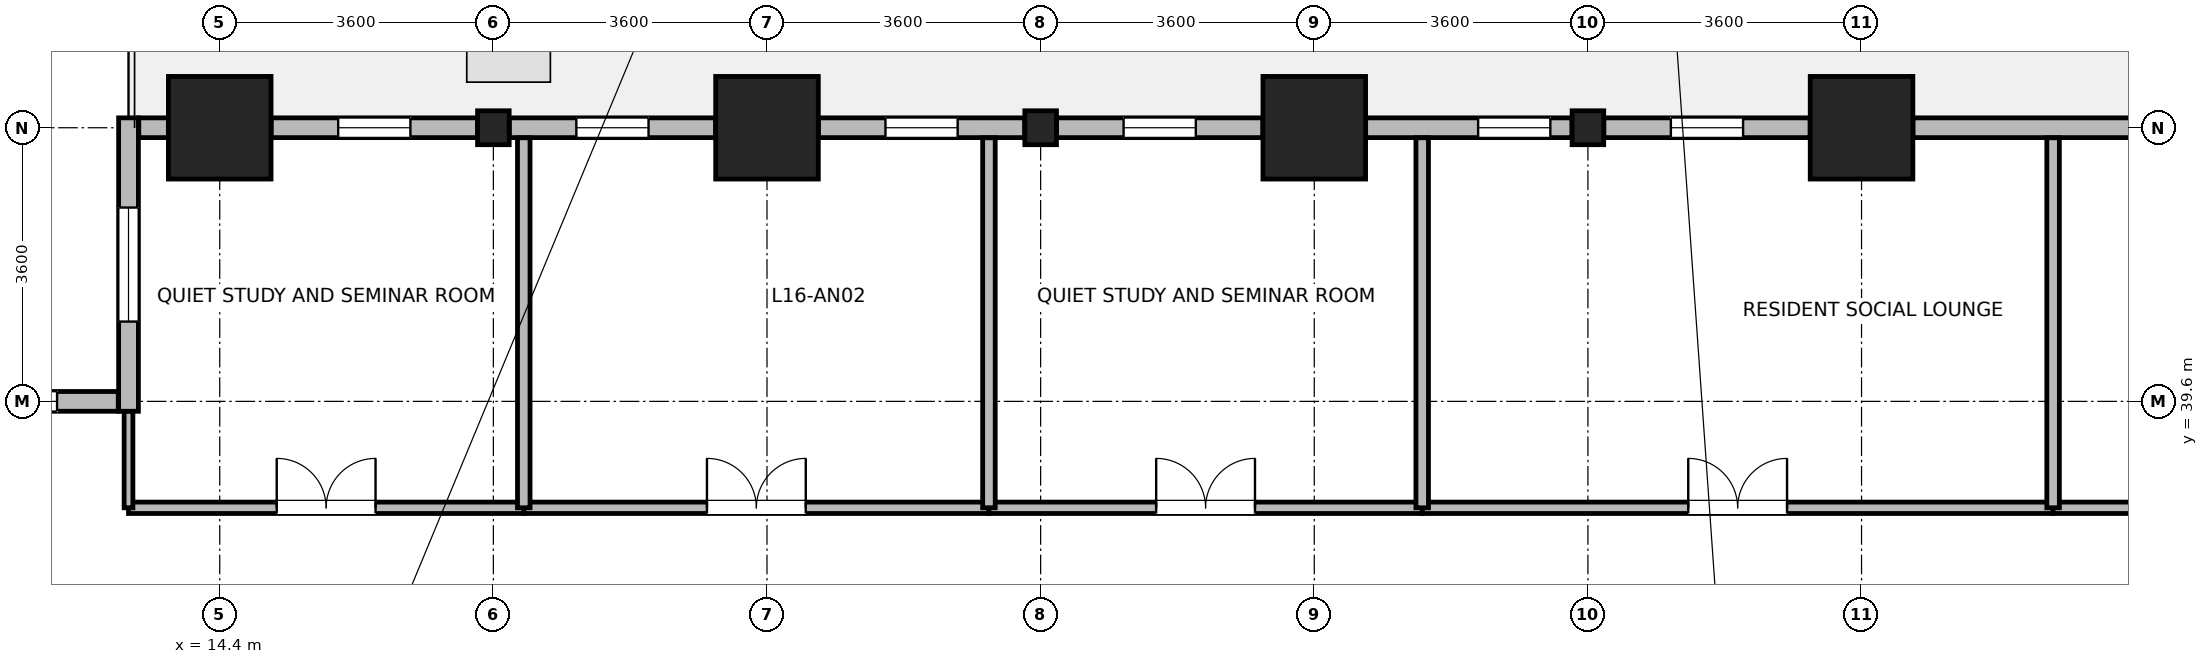
"""IFC4 building model, lengths in metres.
Left out: names, types, materials, properties, quantities, classifications, styles, units other than length and angle.
Written with IfcOpenShell. Run it as: python <this file> out.ifc"""

import sys

from ifc_helpers import new_model, si_unit, direction, frame, frame_2d, origin, origin_2d, place, context, subcontext, project, spatial, rectangle, i_section, extrude, source, transform, mapped, element, fill, save


model = new_model("IFC4")
c1 = context("Model", 3, precision=1e-05, world=origin(), true_north=direction((0.0, 1.0)))
c2 = subcontext(c1, "Body", "Model", "MODEL_VIEW")
j1 = project(units=[si_unit("LENGTHUNIT", "METRE"), si_unit("PLANEANGLEUNIT", "RADIAN")], contexts=[c1])
p1 = place(None, origin())
s1 = spatial("IfcSite", under=j1, at=p1, CompositionType="ELEMENT")
p2 = place(p1, origin())
s2 = spatial("IfcBuilding", under=s1, at=p2, CompositionType="ELEMENT")
p3 = place(p2, frame((0.0, 0.0, 66.0)))
s3 = spatial("IfcBuildingStorey", under=s2, at=p3, CompositionType="ELEMENT", Elevation=66.0)
m1 = source(origin(), c2, "Body", "SweptSolid", [
    extrude(rectangle(XDim=1.35, YDim=1.35, at=origin_2d()), origin(), (0.0, 0.0, 1.0), 3.7),
])
for number, where, z_axis, x_axis in (
    (1, (14.4, 43.2, 0.0), (0.0, 0.0, 1.0), (1.0, 0.0, 0.0)),
    (2, (21.6, 43.2, 0.0), (0.0, 0.0, 1.0), (1.0, 0.0, 0.0)),
    (3, (28.8, 43.2, 0.0), (0.0, 0.0, 1.0), (1.0, 0.0, 0.0)),
    (4, (36.0, 43.2, 0.0), (0.0, 0.0, 1.0), (1.0, 0.0, 0.0)),
):
    element("IfcColumn", number, at=place(p3, frame(where, z_axis=z_axis, x_axis=x_axis)), inside=s3, PredefinedType="COLUMN", context=c2, shape_type="MappedRepresentation", body=[
        mapped(m1, transform((0.0, 0.0, 0.0), x_axis=(1.0, 0.0, 0.0), y_axis=(0.0, 1.0, 0.0), z_axis=(0.0, 0.0, 1.0), scale=1.0)),
    ])
m2 = source(origin(), c2, "Body", "SweptSolid", [
    extrude(i_section(OverallWidth=0.416, OverallDepth=0.446, WebThickness=0.029, FlangeThickness=0.04, FilletRadius=0.015, at=origin_2d()), origin(), (0.0, 0.0, 1.0), 3.7),
])
for number, where, z_axis, x_axis in (
    (5, (18.0, 43.2, 0.0), (0.0, 0.0, 1.0), (1.0, 0.0, 0.0)),
    (6, (25.2, 43.2, 0.0), (0.0, 0.0, 1.0), (1.0, 0.0, 0.0)),
    (7, (32.4, 43.2, 0.0), (0.0, 0.0, 1.0), (1.0, 0.0, 0.0)),
):
    element("IfcColumn", number, at=place(p3, frame(where, z_axis=z_axis, x_axis=x_axis)), inside=s3, PredefinedType="COLUMN", context=c2, shape_type="MappedRepresentation", body=[
        mapped(m2, transform((0.0, 0.0, 0.0), x_axis=(1.0, 0.0, 0.0), y_axis=(0.0, 1.0, 0.0), z_axis=(0.0, 0.0, 1.0), scale=1.0)),
    ])
p4 = place(p3, frame((36.676, 43.2, 0.0), z_axis=(0.0, 0.0, 1.0), x_axis=(1.0, 0.0, 0.0)))
e8 = element("IfcWall", 8, at=p4, inside=s3, PredefinedType="STANDARD", context=c2, shape_type="SweptSolid", body=[
    extrude(rectangle(XDim=9.448, YDim=0.26, at=frame_2d((4.724, 0.0))), origin(), (0.0, 0.0, 1.0), 2.93),
])
p5 = place(p4, frame((3.974, 0.0, 0.0)))
e9 = element("IfcOpeningElement", 9, at=p5, cuts=e8, PredefinedType="OPENING", context=c2, shape_type="SweptSolid", body=[
    extrude(rectangle(XDim=1.5, YDim=2.15, at=frame_2d((0.75, 1.075))), frame((0.0, 0.14, 0.0), z_axis=(0.0, -1.0, 0.0), x_axis=(1.0, 0.0, 0.0)), (0.0, 0.0, 1.0), 0.28),
])
p6 = place(p4, frame((7.123, 0.0, 0.85)))
e10 = element("IfcOpeningElement", 10, at=p6, cuts=e8, PredefinedType="OPENING", context=c2, shape_type="SweptSolid", body=[
    extrude(rectangle(XDim=1.5, YDim=1.85, at=frame_2d((0.75, 0.925))), frame((0.0, 0.14, 0.0), z_axis=(0.0, -1.0, 0.0), x_axis=(1.0, 0.0, 0.0)), (0.0, 0.0, 1.0), 0.28),
])
p7 = place(p3, frame((32.609, 43.2, 0.0), z_axis=(0.0, 0.0, 1.0), x_axis=(1.0, 0.0, 0.0)))
e11 = element("IfcWall", 11, at=p7, inside=s3, PredefinedType="STANDARD", context=c2, shape_type="SweptSolid", body=[
    extrude(rectangle(XDim=2.715, YDim=0.26, at=frame_2d((1.357, 0.0))), origin(), (0.0, 0.0, 1.0), 2.93),
])
p8 = place(p7, frame((0.883, 0.0, 0.85)))
e12 = element("IfcOpeningElement", 12, at=p8, cuts=e11, PredefinedType="OPENING", context=c2, shape_type="SweptSolid", body=[
    extrude(rectangle(XDim=0.95, YDim=1.75, at=frame_2d((0.475, 0.875))), frame((0.0, 0.14, 0.0), z_axis=(0.0, -1.0, 0.0), x_axis=(1.0, 0.0, 0.0)), (0.0, 0.0, 1.0), 0.28),
])
p9 = place(p3, frame((29.476, 43.2, 0.0), z_axis=(0.0, 0.0, 1.0), x_axis=(1.0, 0.0, 0.0)))
e13 = element("IfcWall", 13, at=p9, inside=s3, PredefinedType="STANDARD", context=c2, shape_type="SweptSolid", body=[
    extrude(rectangle(XDim=2.715, YDim=0.26, at=frame_2d((1.357, 0.0))), origin(), (0.0, 0.0, 1.0), 2.93),
])
p10 = place(p9, frame((1.48, 0.0, 0.85)))
e14 = element("IfcOpeningElement", 14, at=p10, cuts=e13, PredefinedType="OPENING", context=c2, shape_type="SweptSolid", body=[
    extrude(rectangle(XDim=0.95, YDim=1.75, at=frame_2d((0.475, 0.875))), frame((0.0, 0.14, 0.0), z_axis=(0.0, -1.0, 0.0), x_axis=(1.0, 0.0, 0.0)), (0.0, 0.0, 1.0), 0.28),
])
p11 = place(p3, frame((25.409, 43.2, 0.0), z_axis=(0.0, 0.0, 1.0), x_axis=(1.0, 0.0, 0.0)))
e15 = element("IfcWall", 15, at=p11, inside=s3, PredefinedType="STANDARD", context=c2, shape_type="SweptSolid", body=[
    extrude(rectangle(XDim=2.715, YDim=0.26, at=frame_2d((1.357, 0.0))), origin(), (0.0, 0.0, 1.0), 2.93),
])
p12 = place(p11, frame((0.883, 0.0, 0.85)))
e16 = element("IfcOpeningElement", 16, at=p12, cuts=e15, PredefinedType="OPENING", context=c2, shape_type="SweptSolid", body=[
    extrude(rectangle(XDim=0.95, YDim=1.75, at=frame_2d((0.475, 0.875))), frame((0.0, 0.14, 0.0), z_axis=(0.0, -1.0, 0.0), x_axis=(1.0, 0.0, 0.0)), (0.0, 0.0, 1.0), 0.28),
])
p13 = place(p3, frame((22.276, 43.2, 0.0), z_axis=(0.0, 0.0, 1.0), x_axis=(1.0, 0.0, 0.0)))
e17 = element("IfcWall", 17, at=p13, inside=s3, PredefinedType="STANDARD", context=c2, shape_type="SweptSolid", body=[
    extrude(rectangle(XDim=2.715, YDim=0.26, at=frame_2d((1.357, 0.0))), origin(), (0.0, 0.0, 1.0), 2.93),
])
p14 = place(p13, frame((0.883, 0.0, 0.85)))
e18 = element("IfcOpeningElement", 18, at=p14, cuts=e17, PredefinedType="OPENING", context=c2, shape_type="SweptSolid", body=[
    extrude(rectangle(XDim=0.95, YDim=1.75, at=frame_2d((0.475, 0.875))), frame((0.0, 0.14, 0.0), z_axis=(0.0, -1.0, 0.0), x_axis=(1.0, 0.0, 0.0)), (0.0, 0.0, 1.0), 0.28),
])
p15 = place(p3, frame((18.209, 43.2, 0.0), z_axis=(0.0, 0.0, 1.0), x_axis=(1.0, 0.0, 0.0)))
e19 = element("IfcWall", 19, at=p15, inside=s3, PredefinedType="STANDARD", context=c2, shape_type="SweptSolid", body=[
    extrude(rectangle(XDim=2.715, YDim=0.26, at=frame_2d((1.357, 0.0))), origin(), (0.0, 0.0, 1.0), 2.93),
])
p16 = place(p15, frame((0.883, 0.0, 0.85)))
e20 = element("IfcOpeningElement", 20, at=p16, cuts=e19, PredefinedType="OPENING", context=c2, shape_type="SweptSolid", body=[
    extrude(rectangle(XDim=0.95, YDim=1.75, at=frame_2d((0.475, 0.875))), frame((0.0, 0.14, 0.0), z_axis=(0.0, -1.0, 0.0), x_axis=(1.0, 0.0, 0.0)), (0.0, 0.0, 1.0), 0.28),
])
p17 = place(p3, frame((15.076, 43.2, 0.0), z_axis=(0.0, 0.0, 1.0), x_axis=(1.0, 0.0, 0.0)))
e21 = element("IfcWall", 21, at=p17, inside=s3, PredefinedType="STANDARD", context=c2, shape_type="SweptSolid", body=[
    extrude(rectangle(XDim=2.715, YDim=0.26, at=frame_2d((1.357, 0.0))), origin(), (0.0, 0.0, 1.0), 2.93),
])
p18 = place(p17, frame((0.883, 0.0, 0.85)))
e22 = element("IfcOpeningElement", 22, at=p18, cuts=e21, PredefinedType="OPENING", context=c2, shape_type="SweptSolid", body=[
    extrude(rectangle(XDim=0.95, YDim=1.75, at=frame_2d((0.475, 0.875))), frame((0.0, 0.14, 0.0), z_axis=(0.0, -1.0, 0.0), x_axis=(1.0, 0.0, 0.0)), (0.0, 0.0, 1.0), 0.28),
])
p19 = place(p3, frame((13.335, 43.2, 0.0), z_axis=(0.0, 0.0, 1.0), x_axis=(1.0, 0.0, 0.0)))
e23 = element("IfcWall", 23, at=p19, inside=s3, PredefinedType="STANDARD", context=c2, shape_type="SweptSolid", body=[
    extrude(rectangle(XDim=0.389, YDim=0.26, at=frame_2d((0.195, 0.0))), origin(), (0.0, 0.0, 1.0), 3.43),
])
p20 = place(p3, frame((13.2, 39.47, 0.0), z_axis=(0.0, 0.0, 1.0), x_axis=(0.0, 1.0, 0.0)))
e24 = element("IfcWall", 24, at=p20, inside=s3, PredefinedType="STANDARD", context=c2, shape_type="SweptSolid", body=[
    extrude(rectangle(XDim=3.86, YDim=0.26, at=frame_2d((1.93, 0.0))), origin(), (0.0, 0.0, 1.0), 3.43),
])
p21 = place(p20, frame((1.18, 0.0, 0.85)))
e25 = element("IfcOpeningElement", 25, at=p21, cuts=e24, PredefinedType="OPENING", context=c2, shape_type="SweptSolid", body=[
    extrude(rectangle(XDim=1.5, YDim=1.85, at=frame_2d((0.75, 0.925))), frame((0.0, 0.14, 0.0), z_axis=(0.0, -1.0, 0.0), x_axis=(1.0, 0.0, 0.0)), (0.0, 0.0, 1.0), 0.28),
])
p22 = place(p3, frame((3.735, 39.6, 0.0), z_axis=(0.0, 0.0, 1.0), x_axis=(1.0, 0.0, 0.0)))
e26 = element("IfcWall", 26, at=p22, inside=s3, PredefinedType="STANDARD", context=c2, shape_type="SweptSolid", body=[
    extrude(rectangle(XDim=9.33, YDim=0.26, at=frame_2d((4.665, 0.0))), origin(), (0.0, 0.0, 1.0), 3.43),
])
p23 = place(p22, frame((0.805, 0.0, 0.85)))
e27 = element("IfcOpeningElement", 27, at=p23, cuts=e26, PredefinedType="OPENING", context=c2, shape_type="SweptSolid", body=[
    extrude(rectangle(XDim=1.5, YDim=1.85, at=frame_2d((0.75, 0.925))), frame((0.0, 0.14, 0.0), z_axis=(0.0, -1.0, 0.0), x_axis=(1.0, 0.0, 0.0)), (0.0, 0.0, 1.0), 0.28),
])
p24 = place(p22, frame((3.915, 0.0, 0.85)))
e28 = element("IfcOpeningElement", 28, at=p24, cuts=e26, PredefinedType="OPENING", context=c2, shape_type="SweptSolid", body=[
    extrude(rectangle(XDim=1.5, YDim=1.85, at=frame_2d((0.75, 0.925))), frame((0.0, 0.14, 0.0), z_axis=(0.0, -1.0, 0.0), x_axis=(1.0, 0.0, 0.0)), (0.0, 0.0, 1.0), 0.28),
])
p25 = place(p22, frame((7.025, 0.0, 0.85)))
e29 = element("IfcOpeningElement", 29, at=p25, cuts=e26, PredefinedType="OPENING", context=c2, shape_type="SweptSolid", body=[
    extrude(rectangle(XDim=1.5, YDim=1.85, at=frame_2d((0.75, 0.925))), frame((0.0, 0.14, 0.0), z_axis=(0.0, -1.0, 0.0), x_axis=(1.0, 0.0, 0.0)), (0.0, 0.0, 1.0), 0.28),
])
p26 = place(p3, frame((30.22, 38.2, 0.0), z_axis=(0.0, 0.0, 1.0), x_axis=(1.0, 0.0, 0.0)))
e30 = element("IfcWall", 30, at=p26, inside=s3, PredefinedType="PARTITIONING", context=c2, shape_type="SweptSolid", body=[
    extrude(rectangle(XDim=8.3, YDim=0.15, at=frame_2d((4.15, 0.0))), origin(), (0.0, 0.0, 1.0), 3.43),
])
p27 = place(p26, frame((3.5, 0.0, 0.0)))
e31 = element("IfcOpeningElement", 31, at=p27, cuts=e30, PredefinedType="OPENING", context=c2, shape_type="SweptSolid", body=[
    extrude(rectangle(XDim=1.3, YDim=2.12, at=frame_2d((0.65, 1.06))), frame((0.0, 0.085, 0.0), z_axis=(0.0, -1.0, 0.0), x_axis=(1.0, 0.0, 0.0)), (0.0, 0.0, 1.0), 0.17),
])
p28 = place(p3, frame((38.52, 38.2, 0.0), z_axis=(0.0, 0.0, 1.0), x_axis=(1.0, 0.0, 0.0)))
e32 = element("IfcWall", 32, at=p28, inside=s3, PredefinedType="PARTITIONING", context=c2, shape_type="SweptSolid", body=[
    extrude(rectangle(XDim=7.64, YDim=0.15, at=frame_2d((3.82, 0.0))), origin(), (0.0, 0.0, 1.0), 3.43),
])
p29 = place(p28, frame((3.37, 0.0, 0.0)))
e33 = element("IfcOpeningElement", 33, at=p29, cuts=e32, PredefinedType="OPENING", context=c2, shape_type="SweptSolid", body=[
    extrude(rectangle(XDim=0.9, YDim=2.08, at=frame_2d((0.45, 1.04))), frame((0.0, 0.085, 0.0), z_axis=(0.0, -1.0, 0.0), x_axis=(1.0, 0.0, 0.0)), (0.0, 0.0, 1.0), 0.17),
])
p30 = place(p3, frame((18.4, 38.2, 0.0), z_axis=(0.0, 0.0, 1.0), x_axis=(1.0, 0.0, 0.0)))
e34 = element("IfcWall", 34, at=p30, inside=s3, PredefinedType="PARTITIONING", context=c2, shape_type="SweptSolid", body=[
    extrude(rectangle(XDim=6.12, YDim=0.15, at=frame_2d((3.06, 0.0))), origin(), (0.0, 0.0, 1.0), 3.43),
])
p31 = place(p30, frame((2.41, 0.0, 0.0)))
e35 = element("IfcOpeningElement", 35, at=p31, cuts=e34, PredefinedType="OPENING", context=c2, shape_type="SweptSolid", body=[
    extrude(rectangle(XDim=1.3, YDim=2.12, at=frame_2d((0.65, 1.06))), frame((0.0, 0.085, 0.0), z_axis=(0.0, -1.0, 0.0), x_axis=(1.0, 0.0, 0.0)), (0.0, 0.0, 1.0), 0.17),
])
p32 = place(p3, frame((24.52, 38.2, 0.0), z_axis=(0.0, 0.0, 1.0), x_axis=(1.0, 0.0, 0.0)))
e36 = element("IfcWall", 36, at=p32, inside=s3, PredefinedType="PARTITIONING", context=c2, shape_type="SweptSolid", body=[
    extrude(rectangle(XDim=5.7, YDim=0.15, at=frame_2d((2.85, 0.0))), origin(), (0.0, 0.0, 1.0), 3.43),
])
p33 = place(p32, frame((2.2, 0.0, 0.0)))
e37 = element("IfcOpeningElement", 37, at=p33, cuts=e36, PredefinedType="OPENING", context=c2, shape_type="SweptSolid", body=[
    extrude(rectangle(XDim=1.3, YDim=2.12, at=frame_2d((0.65, 1.06))), frame((0.0, 0.085, 0.0), z_axis=(0.0, -1.0, 0.0), x_axis=(1.0, 0.0, 0.0)), (0.0, 0.0, 1.0), 0.17),
])
p34 = place(p3, frame((13.2, 38.2, 0.0), z_axis=(0.0, 0.0, 1.0), x_axis=(1.0, 0.0, 0.0)))
e38 = element("IfcWall", 38, at=p34, inside=s3, PredefinedType="PARTITIONING", context=c2, shape_type="SweptSolid", body=[
    extrude(rectangle(XDim=5.2, YDim=0.15, at=frame_2d((2.6, 0.0))), origin(), (0.0, 0.0, 1.0), 3.43),
])
p35 = place(p34, frame((1.95, 0.0, 0.0)))
e39 = element("IfcOpeningElement", 39, at=p35, cuts=e38, PredefinedType="OPENING", context=c2, shape_type="SweptSolid", body=[
    extrude(rectangle(XDim=1.3, YDim=2.12, at=frame_2d((0.65, 1.06))), frame((0.0, 0.085, 0.0), z_axis=(0.0, -1.0, 0.0), x_axis=(1.0, 0.0, 0.0)), (0.0, 0.0, 1.0), 0.17),
])
p36 = place(p3, frame((13.2, 38.2, 0.0), z_axis=(0.0, 0.0, 1.0), x_axis=(0.0, 1.0, 0.0)))
e40 = element("IfcWall", 40, at=p36, inside=s3, PredefinedType="PARTITIONING", context=c2, shape_type="SweptSolid", body=[
    extrude(rectangle(XDim=1.268, YDim=0.115, at=frame_2d((0.634, 0.0))), origin(), (0.0, 0.0, 1.0), 3.43),
])
for number, where, z_axis, x_axis in (
    (41, (18.4, 38.2, 0.0), (0.0, 0.0, 1.0), (0.0, 1.0, 0.0)),
    (42, (24.52, 38.2, 0.0), (0.0, 0.0, 1.0), (0.0, 1.0, 0.0)),
    (43, (30.22, 38.2, 0.0), (0.0, 0.0, 1.0), (0.0, 1.0, 0.0)),
    (44, (38.52, 38.2, 0.0), (0.0, 0.0, 1.0), (0.0, 1.0, 0.0)),
):
    element("IfcWall", number, at=place(p3, frame(where, z_axis=z_axis, x_axis=x_axis)), inside=s3, PredefinedType="PARTITIONING", context=c2, shape_type="SweptSolid", body=[
        extrude(rectangle(XDim=4.868, YDim=0.165, at=frame_2d((2.434, 0.0))), origin(), (0.0, 0.0, 1.0), 3.43),
    ])
p37 = place(p8, origin())
e45 = element("IfcWindow", 45, at=p37, inside=s3, PartitioningType="SINGLE_PANEL", PredefinedType="WINDOW", context=c2, shape_type="SweptSolid", body=[
    extrude(rectangle(XDim=0.95, YDim=1.75, at=frame_2d((0.475, 0.875))), frame((0.0, 0.03, 0.0), z_axis=(0.0, -1.0, 0.0), x_axis=(1.0, 0.0, 0.0)), (0.0, 0.0, 1.0), 0.06),
])
fill(e12, e45)
p38 = place(p10, origin())
e46 = element("IfcWindow", 46, at=p38, inside=s3, PartitioningType="SINGLE_PANEL", PredefinedType="WINDOW", context=c2, shape_type="SweptSolid", body=[
    extrude(rectangle(XDim=0.95, YDim=1.75, at=frame_2d((0.475, 0.875))), frame((0.0, 0.03, 0.0), z_axis=(0.0, -1.0, 0.0), x_axis=(1.0, 0.0, 0.0)), (0.0, 0.0, 1.0), 0.06),
])
fill(e14, e46)
p39 = place(p12, origin())
e47 = element("IfcWindow", 47, at=p39, inside=s3, PartitioningType="SINGLE_PANEL", PredefinedType="WINDOW", context=c2, shape_type="SweptSolid", body=[
    extrude(rectangle(XDim=0.95, YDim=1.75, at=frame_2d((0.475, 0.875))), frame((0.0, 0.03, 0.0), z_axis=(0.0, -1.0, 0.0), x_axis=(1.0, 0.0, 0.0)), (0.0, 0.0, 1.0), 0.06),
])
fill(e16, e47)
p40 = place(p14, origin())
e48 = element("IfcWindow", 48, at=p40, inside=s3, PartitioningType="SINGLE_PANEL", PredefinedType="WINDOW", context=c2, shape_type="SweptSolid", body=[
    extrude(rectangle(XDim=0.95, YDim=1.75, at=frame_2d((0.475, 0.875))), frame((0.0, 0.03, 0.0), z_axis=(0.0, -1.0, 0.0), x_axis=(1.0, 0.0, 0.0)), (0.0, 0.0, 1.0), 0.06),
])
fill(e18, e48)
p41 = place(p16, origin())
e49 = element("IfcWindow", 49, at=p41, inside=s3, PartitioningType="SINGLE_PANEL", PredefinedType="WINDOW", context=c2, shape_type="SweptSolid", body=[
    extrude(rectangle(XDim=0.95, YDim=1.75, at=frame_2d((0.475, 0.875))), frame((0.0, 0.03, 0.0), z_axis=(0.0, -1.0, 0.0), x_axis=(1.0, 0.0, 0.0)), (0.0, 0.0, 1.0), 0.06),
])
fill(e20, e49)
p42 = place(p18, origin())
e50 = element("IfcWindow", 50, at=p42, inside=s3, PartitioningType="SINGLE_PANEL", PredefinedType="WINDOW", context=c2, shape_type="SweptSolid", body=[
    extrude(rectangle(XDim=0.95, YDim=1.75, at=frame_2d((0.475, 0.875))), frame((0.0, 0.03, 0.0), z_axis=(0.0, -1.0, 0.0), x_axis=(1.0, 0.0, 0.0)), (0.0, 0.0, 1.0), 0.06),
])
fill(e22, e50)
p43 = place(p21, origin())
e51 = element("IfcWindow", 51, at=p43, inside=s3, PartitioningType="SINGLE_PANEL", PredefinedType="WINDOW", context=c2, shape_type="SweptSolid", body=[
    extrude(rectangle(XDim=1.5, YDim=1.85, at=frame_2d((0.75, 0.925))), frame((0.0, 0.03, 0.0), z_axis=(0.0, -1.0, 0.0), x_axis=(1.0, 0.0, 0.0)), (0.0, 0.0, 1.0), 0.06),
])
fill(e25, e51)
p44 = place(p25, origin())
e52 = element("IfcWindow", 52, at=p44, inside=s3, PartitioningType="SINGLE_PANEL", PredefinedType="WINDOW", context=c2, shape_type="SweptSolid", body=[
    extrude(rectangle(XDim=1.5, YDim=1.85, at=frame_2d((0.75, 0.925))), frame((0.0, 0.03, 0.0), z_axis=(0.0, -1.0, 0.0), x_axis=(1.0, 0.0, 0.0)), (0.0, 0.0, 1.0), 0.06),
])
fill(e29, e52)
p45 = place(p27, origin())
e53 = element("IfcDoor", 53, at=p45, inside=s3, OperationType="DOUBLE_DOOR_SINGLE_SWING", PredefinedType="DOOR", context=c2, shape_type="SweptSolid", body=[
    extrude(rectangle(XDim=1.3, YDim=2.12, at=frame_2d((0.65, 1.06))), frame((0.0, 0.025, 0.0), z_axis=(0.0, -1.0, 0.0), x_axis=(1.0, 0.0, 0.0)), (0.0, 0.0, 1.0), 0.05),
])
fill(e31, e53)
p46 = place(p31, origin())
e54 = element("IfcDoor", 54, at=p46, inside=s3, OperationType="DOUBLE_DOOR_SINGLE_SWING", PredefinedType="DOOR", context=c2, shape_type="SweptSolid", body=[
    extrude(rectangle(XDim=1.3, YDim=2.12, at=frame_2d((0.65, 1.06))), frame((0.0, 0.025, 0.0), z_axis=(0.0, -1.0, 0.0), x_axis=(1.0, 0.0, 0.0)), (0.0, 0.0, 1.0), 0.05),
])
fill(e35, e54)
p47 = place(p33, origin())
e55 = element("IfcDoor", 55, at=p47, inside=s3, OperationType="DOUBLE_DOOR_SINGLE_SWING", PredefinedType="DOOR", context=c2, shape_type="SweptSolid", body=[
    extrude(rectangle(XDim=1.3, YDim=2.12, at=frame_2d((0.65, 1.06))), frame((0.0, 0.025, 0.0), z_axis=(0.0, -1.0, 0.0), x_axis=(1.0, 0.0, 0.0)), (0.0, 0.0, 1.0), 0.05),
])
fill(e37, e55)
p48 = place(p35, origin())
e56 = element("IfcDoor", 56, at=p48, inside=s3, OperationType="DOUBLE_DOOR_SINGLE_SWING", PredefinedType="DOOR", context=c2, shape_type="SweptSolid", body=[
    extrude(rectangle(XDim=1.3, YDim=2.12, at=frame_2d((0.65, 1.06))), frame((0.0, 0.025, 0.0), z_axis=(0.0, -1.0, 0.0), x_axis=(1.0, 0.0, 0.0)), (0.0, 0.0, 1.0), 0.05),
])
fill(e39, e56)
save(model, sys.argv[1])
